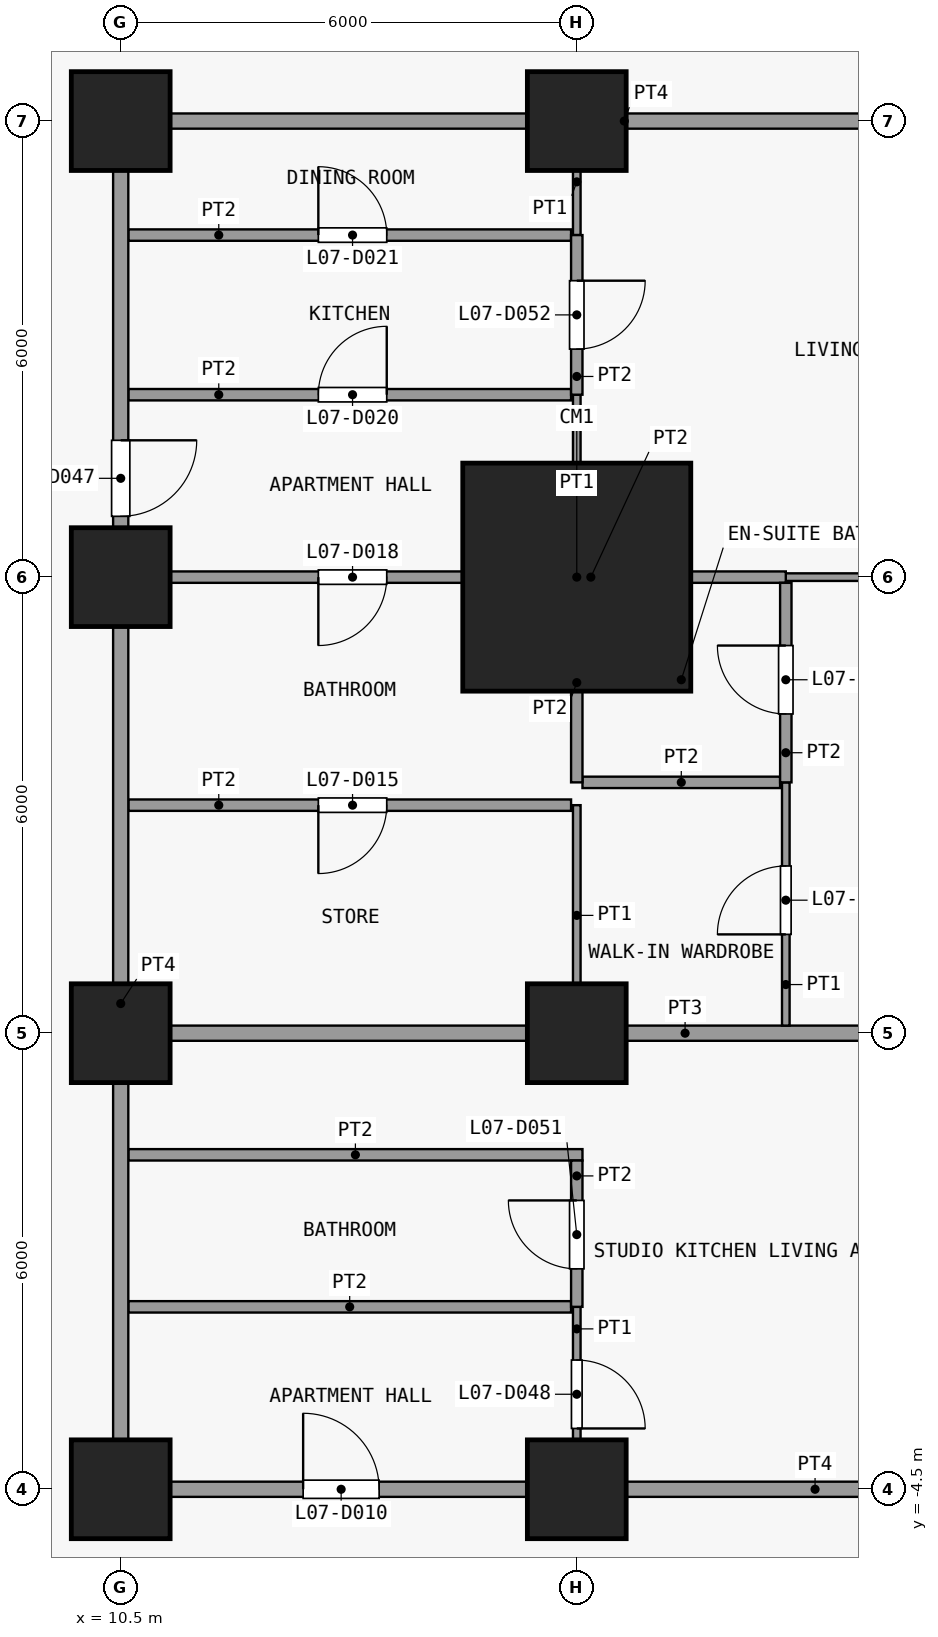
"""IFC4 building model, lengths in metres.
Left out: names, types, materials, properties, quantities, classifications, styles, units other than length and angle.
Written with IfcOpenShell. Run it as: python <this file> out.ifc"""

import sys

from ifc_helpers import new_model, si_unit, direction, frame, frame_2d, origin, origin_2d, place, context, subcontext, project, spatial, rectangle, extrude, element, fill, save


model = new_model("IFC4")
c1 = context("Model", 3, precision=1e-05, world=origin(), true_north=direction((0.0, 1.0)))
c2 = subcontext(c1, "Body", "Model", "MODEL_VIEW")
j1 = project(units=[si_unit("LENGTHUNIT", "METRE"), si_unit("PLANEANGLEUNIT", "RADIAN")], contexts=[c1])
p1 = place(None, origin())
s1 = spatial("IfcSite", under=j1, at=p1, CompositionType="ELEMENT")
p2 = place(p1, origin())
s2 = spatial("IfcBuilding", under=s1, at=p2, CompositionType="ELEMENT")
p3 = place(p2, frame((0.0, 0.0, 36.1)))
s3 = spatial("IfcBuildingStorey", under=s2, at=p3, CompositionType="ELEMENT", Elevation=36.1)
for number, where, z_axis, x_axis in (
    (1, (10.5, -4.5, 0.0), (0.0, 0.0, 1.0), (1.0, 0.0, 0.0)),
    (2, (10.5, 1.5, 0.0), (0.0, 0.0, 1.0), (1.0, 0.0, 0.0)),
    (3, (10.5, 7.5, 0.0), (0.0, 0.0, 1.0), (1.0, 0.0, 0.0)),
    (4, (10.5, 13.5, 0.0), (0.0, 0.0, 1.0), (1.0, 0.0, 0.0)),
    (5, (16.5, -4.5, 0.0), (0.0, 0.0, 1.0), (1.0, 0.0, 0.0)),
    (6, (16.5, 1.5, 0.0), (0.0, 0.0, 1.0), (1.0, 0.0, 0.0)),
):
    element("IfcColumn", number, at=place(p3, frame(where, z_axis=z_axis, x_axis=x_axis)), inside=s3, PredefinedType="COLUMN", context=c2, shape_type="SweptSolid", body=[
        extrude(rectangle(XDim=1.3, YDim=1.3, at=origin_2d()), origin(), (0.0, 0.0, 1.0), 3.6),
    ])
p4 = place(p3, frame((16.5, 7.5, 0.0), z_axis=(0.0, 0.0, 1.0), x_axis=(1.0, 0.0, 0.0)))
e7 = element("IfcColumn", 7, at=p4, inside=s3, PredefinedType="COLUMN", context=c2, shape_type="SweptSolid", body=[
    extrude(rectangle(XDim=3.0, YDim=3.0, at=origin_2d()), origin(), (0.0, 0.0, 1.0), 3.6),
])
p5 = place(p3, frame((16.5, 13.5, 0.0), z_axis=(0.0, 0.0, 1.0), x_axis=(1.0, 0.0, 0.0)))
e8 = element("IfcColumn", 8, at=p5, inside=s3, PredefinedType="COLUMN", context=c2, shape_type="SweptSolid", body=[
    extrude(rectangle(XDim=1.3, YDim=1.3, at=origin_2d()), origin(), (0.0, 0.0, 1.0), 3.6),
])
p6 = place(p3, frame((10.4, -4.5, 0.0), z_axis=(0.0, 0.0, 1.0), x_axis=(1.0, 0.0, 0.0)))
e9 = element("IfcWall", 9, at=p6, inside=s3, PredefinedType="PARTITIONING", context=c2, shape_type="SweptSolid", body=[
    extrude(rectangle(XDim=14.85, YDim=0.2, at=frame_2d((7.425, 0.0))), origin(), (0.0, 0.0, 1.0), 3.3),
])
p7 = place(p6, frame((2.5, 0.0, 0.0)))
e10 = element("IfcOpeningElement", 10, at=p7, cuts=e9, PredefinedType="OPENING", context=c2, shape_type="SweptSolid", body=[
    extrude(rectangle(XDim=1.0, YDim=2.1, at=frame_2d((0.5, 1.05))), frame((0.0, 0.11, 0.0), z_axis=(0.0, -1.0, 0.0), x_axis=(1.0, 0.0, 0.0)), (0.0, 0.0, 1.0), 0.22),
])
p8 = place(p3, frame((10.6, -2.1, 0.0), z_axis=(0.0, 0.0, 1.0), x_axis=(1.0, 0.0, 0.0)))
e11 = element("IfcWall", 11, at=p8, inside=s3, PredefinedType="PARTITIONING", context=c2, shape_type="SweptSolid", body=[
    extrude(rectangle(XDim=5.825, YDim=0.15, at=frame_2d((2.913, 0.0))), origin(), (0.0, 0.0, 1.0), 3.3),
])
p9 = place(p3, frame((10.6, -0.1, 0.0), z_axis=(0.0, 0.0, 1.0), x_axis=(1.0, 0.0, 0.0)))
e12 = element("IfcWall", 12, at=p9, inside=s3, PredefinedType="PARTITIONING", context=c2, shape_type="SweptSolid", body=[
    extrude(rectangle(XDim=5.975, YDim=0.15, at=frame_2d((2.987, 0.0))), origin(), (0.0, 0.0, 1.0), 3.3),
])
p10 = place(p3, frame((10.6, 1.5, 0.0), z_axis=(0.0, 0.0, 1.0), x_axis=(1.0, 0.0, 0.0)))
e13 = element("IfcWall", 13, at=p10, inside=s3, PredefinedType="PARTITIONING", context=c2, shape_type="SweptSolid", body=[
    extrude(rectangle(XDim=14.65, YDim=0.2, at=frame_2d((7.325, 0.0))), origin(), (0.0, 0.0, 1.0), 3.3),
])
p11 = place(p3, frame((10.6, 4.5, 0.0), z_axis=(0.0, 0.0, 1.0), x_axis=(1.0, 0.0, 0.0)))
e14 = element("IfcWall", 14, at=p11, inside=s3, PredefinedType="PARTITIONING", context=c2, shape_type="SweptSolid", body=[
    extrude(rectangle(XDim=5.825, YDim=0.15, at=frame_2d((2.913, 0.0))), origin(), (0.0, 0.0, 1.0), 3.3),
])
p12 = place(p11, frame((2.5, 0.0, 0.0)))
e15 = element("IfcOpeningElement", 15, at=p12, cuts=e14, PredefinedType="OPENING", context=c2, shape_type="SweptSolid", body=[
    extrude(rectangle(XDim=0.9, YDim=2.1, at=frame_2d((0.45, 1.05))), frame((0.0, 0.085, 0.0), z_axis=(0.0, -1.0, 0.0), x_axis=(1.0, 0.0, 0.0)), (0.0, 0.0, 1.0), 0.17),
])
p13 = place(p3, frame((16.575, 4.8, 0.0), z_axis=(0.0, 0.0, 1.0), x_axis=(1.0, 0.0, 0.0)))
e16 = element("IfcWall", 16, at=p13, inside=s3, PredefinedType="PARTITIONING", context=c2, shape_type="SweptSolid", body=[
    extrude(rectangle(XDim=2.6, YDim=0.15, at=frame_2d((1.3, 0.0))), origin(), (0.0, 0.0, 1.0), 3.3),
])
p14 = place(p3, frame((19.25, 7.5, 0.0), z_axis=(0.0, 0.0, 1.0), x_axis=(1.0, 0.0, 0.0)))
e17 = element("IfcWall", 17, at=p14, inside=s3, PredefinedType="PARTITIONING", context=c2, shape_type="SweptSolid", body=[
    extrude(rectangle(XDim=4.6, YDim=0.1, at=frame_2d((2.3, 0.0))), origin(), (0.0, 0.0, 1.0), 3.3),
])
p15 = place(p14, frame((1.7, 0.0, 0.0)))
e18 = element("IfcOpeningElement", 18, at=p15, cuts=e17, PredefinedType="OPENING", context=c2, shape_type="SweptSolid", body=[
    extrude(rectangle(XDim=0.9, YDim=2.1, at=frame_2d((0.45, 1.05))), frame((0.0, 0.06, 0.0), z_axis=(0.0, -1.0, 0.0), x_axis=(1.0, 0.0, 0.0)), (0.0, 0.0, 1.0), 0.12),
])
p16 = place(p3, frame((10.6, 7.5, 0.0), z_axis=(0.0, 0.0, 1.0), x_axis=(1.0, 0.0, 0.0)))
e19 = element("IfcWall", 19, at=p16, inside=s3, PredefinedType="PARTITIONING", context=c2, shape_type="SweptSolid", body=[
    extrude(rectangle(XDim=8.65, YDim=0.15, at=frame_2d((4.325, 0.0))), origin(), (0.0, 0.0, 1.0), 3.3),
])
p17 = place(p16, frame((2.5, 0.0, 0.0)))
e20 = element("IfcOpeningElement", 20, at=p17, cuts=e19, PredefinedType="OPENING", context=c2, shape_type="SweptSolid", body=[
    extrude(rectangle(XDim=0.9, YDim=2.1, at=frame_2d((0.45, 1.05))), frame((0.0, 0.085, 0.0), z_axis=(0.0, -1.0, 0.0), x_axis=(1.0, 0.0, 0.0)), (0.0, 0.0, 1.0), 0.17),
])
p18 = place(p3, frame((10.6, 9.9, 0.0), z_axis=(0.0, 0.0, 1.0), x_axis=(1.0, 0.0, 0.0)))
e21 = element("IfcWall", 21, at=p18, inside=s3, PredefinedType="PARTITIONING", context=c2, shape_type="SweptSolid", body=[
    extrude(rectangle(XDim=5.825, YDim=0.15, at=frame_2d((2.913, 0.0))), origin(), (0.0, 0.0, 1.0), 3.3),
])
p19 = place(p18, frame((2.5, 0.0, 0.0)))
e22 = element("IfcOpeningElement", 22, at=p19, cuts=e21, PredefinedType="OPENING", context=c2, shape_type="SweptSolid", body=[
    extrude(rectangle(XDim=0.9, YDim=2.1, at=frame_2d((0.45, 1.05))), frame((0.0, 0.085, 0.0), z_axis=(0.0, -1.0, 0.0), x_axis=(1.0, 0.0, 0.0)), (0.0, 0.0, 1.0), 0.17),
])
p20 = place(p3, frame((10.6, 12.0, 0.0), z_axis=(0.0, 0.0, 1.0), x_axis=(1.0, 0.0, 0.0)))
e23 = element("IfcWall", 23, at=p20, inside=s3, PredefinedType="PARTITIONING", context=c2, shape_type="SweptSolid", body=[
    extrude(rectangle(XDim=5.825, YDim=0.15, at=frame_2d((2.913, 0.0))), origin(), (0.0, 0.0, 1.0), 3.3),
])
p21 = place(p20, frame((2.5, 0.0, 0.0)))
e24 = element("IfcOpeningElement", 24, at=p21, cuts=e23, PredefinedType="OPENING", context=c2, shape_type="SweptSolid", body=[
    extrude(rectangle(XDim=0.9, YDim=2.1, at=frame_2d((0.45, 1.05))), frame((0.0, 0.085, 0.0), z_axis=(0.0, -1.0, 0.0), x_axis=(1.0, 0.0, 0.0)), (0.0, 0.0, 1.0), 0.17),
])
p22 = place(p3, frame((10.4, 13.5, 0.0), z_axis=(0.0, 0.0, 1.0), x_axis=(1.0, 0.0, 0.0)))
e25 = element("IfcWall", 25, at=p22, inside=s3, PredefinedType="PARTITIONING", context=c2, shape_type="SweptSolid", body=[
    extrude(rectangle(XDim=13.45, YDim=0.2, at=frame_2d((6.725, 0.0))), origin(), (0.0, 0.0, 1.0), 3.3),
])
p23 = place(p3, frame((10.5, -4.4, 0.0), z_axis=(0.0, 0.0, 1.0), x_axis=(0.0, 1.0, 0.0)))
e26 = element("IfcWall", 26, at=p23, inside=s3, PredefinedType="PARTITIONING", context=c2, shape_type="SweptSolid", body=[
    extrude(rectangle(XDim=17.8, YDim=0.2, at=frame_2d((8.9, 0.0))), origin(), (0.0, 0.0, 1.0), 3.3),
])
p24 = place(p23, frame((12.7, 0.0, 0.0)))
e27 = element("IfcOpeningElement", 27, at=p24, cuts=e26, PredefinedType="OPENING", context=c2, shape_type="SweptSolid", body=[
    extrude(rectangle(XDim=1.0, YDim=2.1, at=frame_2d((0.5, 1.05))), frame((0.0, 0.11, 0.0), z_axis=(0.0, -1.0, 0.0), x_axis=(1.0, 0.0, 0.0)), (0.0, 0.0, 1.0), 0.22),
])
p25 = place(p3, frame((16.5, -4.4, 0.0), z_axis=(0.0, 0.0, 1.0), x_axis=(0.0, 1.0, 0.0)))
e28 = element("IfcWall", 28, at=p25, inside=s3, PredefinedType="PARTITIONING", context=c2, shape_type="SweptSolid", body=[
    extrude(rectangle(XDim=2.3, YDim=0.1, at=frame_2d((1.15, 0.0))), origin(), (0.0, 0.0, 1.0), 3.3),
])
p26 = place(p25, frame((0.7, 0.0, 0.0)))
e29 = element("IfcOpeningElement", 29, at=p26, cuts=e28, PredefinedType="OPENING", context=c2, shape_type="SweptSolid", body=[
    extrude(rectangle(XDim=0.9, YDim=2.1, at=frame_2d((0.45, 1.05))), frame((0.0, 0.06, 0.0), z_axis=(0.0, -1.0, 0.0), x_axis=(1.0, 0.0, 0.0)), (0.0, 0.0, 1.0), 0.12),
])
p27 = place(p3, frame((16.5, 1.6, 0.0), z_axis=(0.0, 0.0, 1.0), x_axis=(0.0, 1.0, 0.0)))
e30 = element("IfcWall", 30, at=p27, inside=s3, PredefinedType="PARTITIONING", context=c2, shape_type="SweptSolid", body=[
    extrude(rectangle(XDim=2.9, YDim=0.1, at=frame_2d((1.45, 0.0))), origin(), (0.0, 0.0, 1.0), 3.3),
])
p28 = place(p3, frame((16.5, 7.575, 0.0), z_axis=(0.0, 0.0, 1.0), x_axis=(0.0, 1.0, 0.0)))
e31 = element("IfcWall", 31, at=p28, inside=s3, PredefinedType="PARTITIONING", context=c2, shape_type="SweptSolid", body=[
    extrude(rectangle(XDim=2.325, YDim=0.1, at=frame_2d((1.163, 0.0))), origin(), (0.0, 0.0, 1.0), 3.3),
])
p29 = place(p3, frame((16.5, 12.0, 0.0), z_axis=(0.0, 0.0, 1.0), x_axis=(0.0, 1.0, 0.0)))
e32 = element("IfcWall", 32, at=p29, inside=s3, PredefinedType="PARTITIONING", context=c2, shape_type="SweptSolid", body=[
    extrude(rectangle(XDim=1.4, YDim=0.1, at=frame_2d((0.7, 0.0))), origin(), (0.0, 0.0, 1.0), 3.3),
])
p30 = place(p3, frame((16.5, -2.1, 0.0), z_axis=(0.0, 0.0, 1.0), x_axis=(0.0, 1.0, 0.0)))
e33 = element("IfcWall", 33, at=p30, inside=s3, PredefinedType="PARTITIONING", context=c2, shape_type="SweptSolid", body=[
    extrude(rectangle(XDim=1.925, YDim=0.15, at=frame_2d((0.962, 0.0))), origin(), (0.0, 0.0, 1.0), 3.3),
])
p31 = place(p30, frame((0.5, 0.0, 0.0)))
e34 = element("IfcOpeningElement", 34, at=p31, cuts=e33, PredefinedType="OPENING", context=c2, shape_type="SweptSolid", body=[
    extrude(rectangle(XDim=0.9, YDim=2.1, at=frame_2d((0.45, 1.05))), frame((0.0, 0.085, 0.0), z_axis=(0.0, -1.0, 0.0), x_axis=(1.0, 0.0, 0.0)), (0.0, 0.0, 1.0), 0.17),
])
p32 = place(p3, frame((16.5, 4.8, 0.0), z_axis=(0.0, 0.0, 1.0), x_axis=(0.0, 1.0, 0.0)))
e35 = element("IfcWall", 35, at=p32, inside=s3, PredefinedType="PARTITIONING", context=c2, shape_type="SweptSolid", body=[
    extrude(rectangle(XDim=2.625, YDim=0.15, at=frame_2d((1.312, 0.0))), origin(), (0.0, 0.0, 1.0), 3.3),
])
p33 = place(p3, frame((16.5, 9.9, 0.0), z_axis=(0.0, 0.0, 1.0), x_axis=(0.0, 1.0, 0.0)))
e36 = element("IfcWall", 36, at=p33, inside=s3, PredefinedType="PARTITIONING", context=c2, shape_type="SweptSolid", body=[
    extrude(rectangle(XDim=2.1, YDim=0.15, at=frame_2d((1.05, 0.0))), origin(), (0.0, 0.0, 1.0), 3.3),
])
p34 = place(p33, frame((0.6, 0.0, 0.0)))
e37 = element("IfcOpeningElement", 37, at=p34, cuts=e36, PredefinedType="OPENING", context=c2, shape_type="SweptSolid", body=[
    extrude(rectangle(XDim=0.9, YDim=2.1, at=frame_2d((0.45, 1.05))), frame((0.0, 0.085, 0.0), z_axis=(0.0, -1.0, 0.0), x_axis=(1.0, 0.0, 0.0)), (0.0, 0.0, 1.0), 0.17),
])
p35 = place(p3, frame((19.25, 1.6, 0.0), z_axis=(0.0, 0.0, 1.0), x_axis=(0.0, 1.0, 0.0)))
e38 = element("IfcWall", 38, at=p35, inside=s3, PredefinedType="PARTITIONING", context=c2, shape_type="SweptSolid", body=[
    extrude(rectangle(XDim=3.2, YDim=0.1, at=frame_2d((1.6, 0.0))), origin(), (0.0, 0.0, 1.0), 3.3),
])
p36 = place(p35, frame((1.2, 0.0, 0.0)))
e39 = element("IfcOpeningElement", 39, at=p36, cuts=e38, PredefinedType="OPENING", context=c2, shape_type="SweptSolid", body=[
    extrude(rectangle(XDim=0.9, YDim=2.1, at=frame_2d((0.45, 1.05))), frame((0.0, 0.06, 0.0), z_axis=(0.0, -1.0, 0.0), x_axis=(1.0, 0.0, 0.0)), (0.0, 0.0, 1.0), 0.12),
])
p37 = place(p3, frame((19.25, 4.8, 0.0), z_axis=(0.0, 0.0, 1.0), x_axis=(0.0, 1.0, 0.0)))
e40 = element("IfcWall", 40, at=p37, inside=s3, PredefinedType="PARTITIONING", context=c2, shape_type="SweptSolid", body=[
    extrude(rectangle(XDim=2.625, YDim=0.15, at=frame_2d((1.312, 0.0))), origin(), (0.0, 0.0, 1.0), 3.3),
])
p38 = place(p37, frame((0.9, 0.0, 0.0)))
e41 = element("IfcOpeningElement", 41, at=p38, cuts=e40, PredefinedType="OPENING", context=c2, shape_type="SweptSolid", body=[
    extrude(rectangle(XDim=0.9, YDim=2.1, at=frame_2d((0.45, 1.05))), frame((0.0, 0.085, 0.0), z_axis=(0.0, -1.0, 0.0), x_axis=(1.0, 0.0, 0.0)), (0.0, 0.0, 1.0), 0.17),
])
p39 = place(p7, origin())
e42 = element("IfcDoor", 42, at=p39, inside=s3, OperationType="SINGLE_SWING_RIGHT", PredefinedType="DOOR", context=c2, shape_type="SweptSolid", body=[
    extrude(rectangle(XDim=1.0, YDim=2.1, at=frame_2d((0.5, 1.05))), frame((0.0, 0.025, 0.0), z_axis=(0.0, -1.0, 0.0), x_axis=(1.0, 0.0, 0.0)), (0.0, 0.0, 1.0), 0.05),
])
fill(e10, e42)
p40 = place(p12, origin())
e43 = element("IfcDoor", 43, at=p40, inside=s3, OperationType="SINGLE_SWING_LEFT", PredefinedType="DOOR", context=c2, shape_type="SweptSolid", body=[
    extrude(rectangle(XDim=0.9, YDim=2.1, at=frame_2d((0.45, 1.05))), frame((0.0, 0.025, 0.0), z_axis=(0.0, -1.0, 0.0), x_axis=(1.0, 0.0, 0.0)), (0.0, 0.0, 1.0), 0.05),
])
fill(e15, e43)
p41 = place(p17, origin())
e44 = element("IfcDoor", 44, at=p41, inside=s3, OperationType="SINGLE_SWING_LEFT", PredefinedType="DOOR", context=c2, shape_type="SweptSolid", body=[
    extrude(rectangle(XDim=0.9, YDim=2.1, at=frame_2d((0.45, 1.05))), frame((0.0, 0.025, 0.0), z_axis=(0.0, -1.0, 0.0), x_axis=(1.0, 0.0, 0.0)), (0.0, 0.0, 1.0), 0.05),
])
fill(e20, e44)
p42 = place(p19, origin())
e45 = element("IfcDoor", 45, at=p42, inside=s3, OperationType="SINGLE_SWING_LEFT", PredefinedType="DOOR", context=c2, shape_type="SweptSolid", body=[
    extrude(rectangle(XDim=0.9, YDim=2.1, at=frame_2d((0.45, 1.05))), frame((0.0, 0.025, 0.0), z_axis=(0.0, -1.0, 0.0), x_axis=(1.0, 0.0, 0.0)), (0.0, 0.0, 1.0), 0.05),
])
fill(e22, e45)
p43 = place(p21, origin())
e46 = element("IfcDoor", 46, at=p43, inside=s3, OperationType="SINGLE_SWING_RIGHT", PredefinedType="DOOR", context=c2, shape_type="SweptSolid", body=[
    extrude(rectangle(XDim=0.9, YDim=2.1, at=frame_2d((0.45, 1.05))), frame((0.0, 0.025, 0.0), z_axis=(0.0, -1.0, 0.0), x_axis=(1.0, 0.0, 0.0)), (0.0, 0.0, 1.0), 0.05),
])
fill(e24, e46)
p44 = place(p24, origin())
e47 = element("IfcDoor", 47, at=p44, inside=s3, OperationType="SINGLE_SWING_RIGHT", PredefinedType="DOOR", context=c2, shape_type="SweptSolid", body=[
    extrude(rectangle(XDim=1.0, YDim=2.1, at=frame_2d((0.5, 1.05))), frame((0.0, 0.025, 0.0), z_axis=(0.0, -1.0, 0.0), x_axis=(1.0, 0.0, 0.0)), (0.0, 0.0, 1.0), 0.05),
])
fill(e27, e47)
p45 = place(p26, origin())
e48 = element("IfcDoor", 48, at=p45, inside=s3, OperationType="SINGLE_SWING_LEFT", PredefinedType="DOOR", context=c2, shape_type="SweptSolid", body=[
    extrude(rectangle(XDim=0.9, YDim=2.1, at=frame_2d((0.45, 1.05))), frame((0.0, 0.025, 0.0), z_axis=(0.0, -1.0, 0.0), x_axis=(1.0, 0.0, 0.0)), (0.0, 0.0, 1.0), 0.05),
])
fill(e29, e48)
p46 = place(p31, origin())
e49 = element("IfcDoor", 49, at=p46, inside=s3, OperationType="SINGLE_SWING_LEFT", PredefinedType="DOOR", context=c2, shape_type="SweptSolid", body=[
    extrude(rectangle(XDim=0.9, YDim=2.1, at=frame_2d((0.45, 1.05))), frame((0.0, 0.025, 0.0), z_axis=(0.0, -1.0, 0.0), x_axis=(1.0, 0.0, 0.0)), (0.0, 0.0, 1.0), 0.05),
])
fill(e34, e49)
p47 = place(p34, origin())
e50 = element("IfcDoor", 50, at=p47, inside=s3, OperationType="SINGLE_SWING_RIGHT", PredefinedType="DOOR", context=c2, shape_type="SweptSolid", body=[
    extrude(rectangle(XDim=0.9, YDim=2.1, at=frame_2d((0.45, 1.05))), frame((0.0, 0.025, 0.0), z_axis=(0.0, -1.0, 0.0), x_axis=(1.0, 0.0, 0.0)), (0.0, 0.0, 1.0), 0.05),
])
fill(e37, e50)
p48 = place(p36, origin())
e51 = element("IfcDoor", 51, at=p48, inside=s3, OperationType="SINGLE_SWING_RIGHT", PredefinedType="DOOR", context=c2, shape_type="SweptSolid", body=[
    extrude(rectangle(XDim=0.9, YDim=2.1, at=frame_2d((0.45, 1.05))), frame((0.0, 0.025, 0.0), z_axis=(0.0, -1.0, 0.0), x_axis=(1.0, 0.0, 0.0)), (0.0, 0.0, 1.0), 0.05),
])
fill(e39, e51)
p49 = place(p38, origin())
e52 = element("IfcDoor", 52, at=p49, inside=s3, OperationType="SINGLE_SWING_LEFT", PredefinedType="DOOR", context=c2, shape_type="SweptSolid", body=[
    extrude(rectangle(XDim=0.9, YDim=2.1, at=frame_2d((0.45, 1.05))), frame((0.0, 0.025, 0.0), z_axis=(0.0, -1.0, 0.0), x_axis=(1.0, 0.0, 0.0)), (0.0, 0.0, 1.0), 0.05),
])
fill(e41, e52)
save(model, sys.argv[1])
